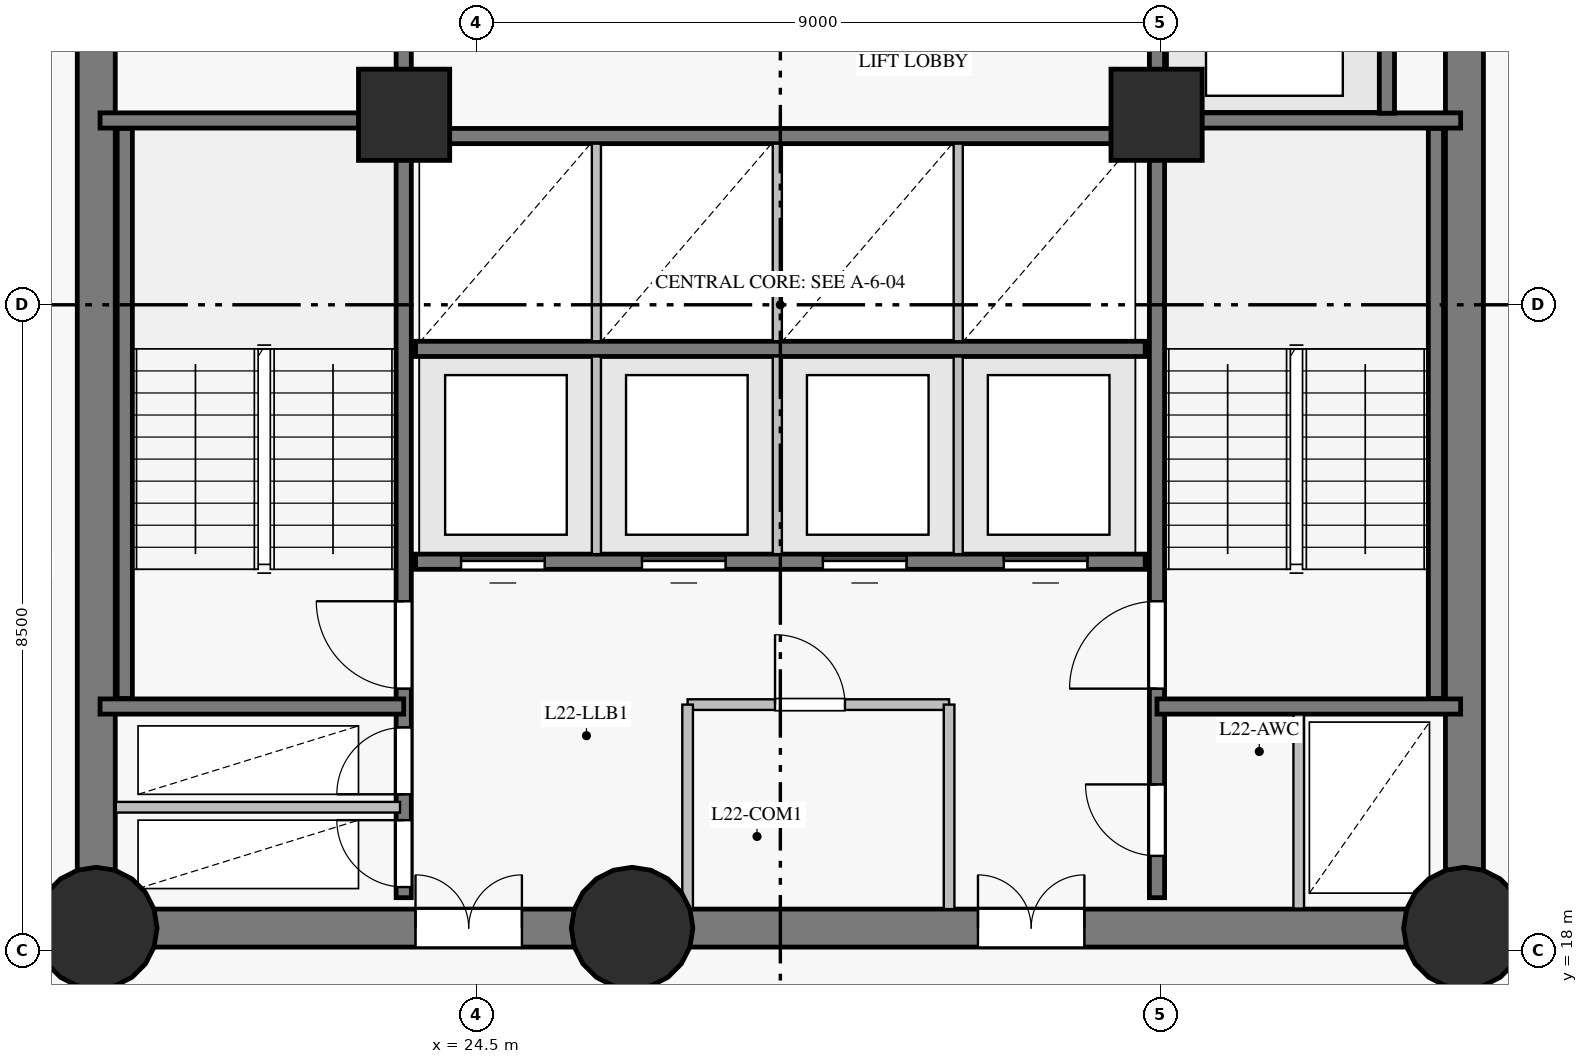
"""IFC4 building model, lengths in metres.
Left out: names, types, materials, properties, quantities, classifications, styles, units other than length and angle.
Written with IfcOpenShell. Run it as: python <this file> out.ifc"""

import sys

from ifc_helpers import new_model, si_unit, direction, frame, frame_2d, origin, origin_with_axes, origin_2d, place, context, subcontext, project, spatial, rectangle, circle, extrude, source, transform, mapped, element, fill, save


model = new_model("IFC4")
c1 = context("Model", 3, precision=1e-05, world=origin(), true_north=direction((0.0, 1.0)))
c2 = subcontext(c1, "Body", "Model", "MODEL_VIEW")
j1 = project(units=[si_unit("LENGTHUNIT", "METRE"), si_unit("PLANEANGLEUNIT", "RADIAN")], contexts=[c1])
p1 = place(None, origin())
s1 = spatial("IfcSite", under=j1, at=p1, CompositionType="ELEMENT")
p2 = place(p1, origin())
s2 = spatial("IfcBuilding", under=s1, at=p2, CompositionType="ELEMENT")
p3 = place(p2, frame((0.0, 0.0, 84.1)))
s3 = spatial("IfcBuildingStorey", under=s2, at=p3, CompositionType="ELEMENT", Elevation=84.1)
p4 = place(p3, frame((19.5, 18.3, 0.0), z_axis=(0.0, 0.0, 1.0), x_axis=(1.0, 0.0, 0.0)))
e1 = element("IfcWall", 1, at=p4, inside=s3, PredefinedType="SHEAR", context=c2, shape_type="SweptSolid", body=[
    extrude(rectangle(XDim=7.05, YDim=0.5, at=frame_2d((3.525, 0.0))), origin(), (0.0, 0.0, 1.0), 3.325),
])
p5 = place(p4, frame((4.2, 0.0, 0.0)))
e2 = element("IfcOpeningElement", 2, at=p5, cuts=e1, PredefinedType="OPENING", context=c2, shape_type="SweptSolid", body=[
    extrude(rectangle(XDim=1.4, YDim=2.2, at=frame_2d((0.7, 1.1))), frame((0.0, 0.26, 0.0), z_axis=(0.0, -1.0, 0.0), x_axis=(1.0, 0.0, 0.0)), (0.0, 0.0, 1.0), 0.52),
])
p6 = place(p3, frame((26.55, 18.3, 0.0), z_axis=(0.0, 0.0, 1.0), x_axis=(1.0, 0.0, 0.0)))
e3 = element("IfcWall", 3, at=p6, inside=s3, PredefinedType="SHEAR", context=c2, shape_type="SweptSolid", body=[
    extrude(rectangle(XDim=10.95, YDim=0.5, at=frame_2d((5.475, 0.0))), origin(), (0.0, 0.0, 1.0), 3.325),
])
p7 = place(p6, frame((4.55, 0.0, 0.0)))
e4 = element("IfcOpeningElement", 4, at=p7, cuts=e3, PredefinedType="OPENING", context=c2, shape_type="SweptSolid", body=[
    extrude(rectangle(XDim=1.4, YDim=2.2, at=frame_2d((0.7, 1.1))), frame((0.0, 0.26, 0.0), z_axis=(0.0, -1.0, 0.0), x_axis=(1.0, 0.0, 0.0)), (0.0, 0.0, 1.0), 0.52),
])
p8 = place(p3, frame((37.5, 18.3, 0.0), z_axis=(0.0, 0.0, 1.0), x_axis=(0.0, 1.0, 0.0)))
e5 = element("IfcWall", 5, at=p8, inside=s3, PredefinedType="SHEAR", context=c2, shape_type="SweptSolid", body=[
    extrude(rectangle(XDim=16.4, YDim=0.5, at=frame_2d((8.2, 0.0))), origin(), (0.0, 0.0, 1.0), 3.325),
])
p9 = place(p8, frame((14.06, 0.0, 0.0)))
e6 = element("IfcOpeningElement", 6, at=p9, cuts=e5, PredefinedType="OPENING", context=c2, shape_type="SweptSolid", body=[
    extrude(rectangle(XDim=1.2, YDim=2.15, at=frame_2d((0.6, 1.075))), frame((0.0, 0.26, 0.0), z_axis=(0.0, -1.0, 0.0), x_axis=(1.0, 0.0, 0.0)), (0.0, 0.0, 1.0), 0.52),
])
p10 = place(p3, frame((19.5, 34.7, 0.0), z_axis=(0.0, 0.0, 1.0), x_axis=(0.0, -1.0, 0.0)))
e7 = element("IfcWall", 7, at=p10, inside=s3, PredefinedType="SHEAR", context=c2, shape_type="SweptSolid", body=[
    extrude(rectangle(XDim=16.4, YDim=0.5, at=frame_2d((8.2, 0.0))), origin(), (0.0, 0.0, 1.0), 3.325),
])
p11 = place(p10, frame((3.1, 0.0, 0.0)))
e8 = element("IfcOpeningElement", 8, at=p11, cuts=e7, PredefinedType="OPENING", context=c2, shape_type="SweptSolid", body=[
    extrude(rectangle(XDim=1.1, YDim=2.15, at=frame_2d((0.55, 1.075))), frame((0.0, 0.26, 0.0), z_axis=(0.0, -1.0, 0.0), x_axis=(1.0, 0.0, 0.0)), (0.0, 0.0, 1.0), 0.52),
])
m1 = source(origin_with_axes(), c2, "Body", "SweptSolid", [
    extrude(circle(Radius=0.8, at=origin_2d()), origin(), (0.0, 0.0, 1.0), 3.6),
])
for number, where, z_axis, x_axis in (
    (9, (19.5, 18.3, 0.0), (0.0, 0.0, 1.0), (1.0, 0.0, 0.0)),
    (10, (26.55, 18.3, 0.0), (0.0, 0.0, 1.0), (1.0, 0.0, 0.0)),
    (11, (37.5, 18.3, 0.0), (0.0, 0.0, 1.0), (1.0, 0.0, 0.0)),
):
    element("IfcColumn", number, at=place(p3, frame(where, z_axis=z_axis, x_axis=x_axis)), inside=s3, PredefinedType="COLUMN", context=c2, shape_type="MappedRepresentation", body=[
        mapped(m1, transform((0.0, 0.0, 0.0), scale=1.0)),
    ])
m2 = source(origin_with_axes(), c2, "Body", "SweptSolid", [
    extrude(rectangle(XDim=1.2, YDim=1.2, at=origin_2d()), origin(), (0.0, 0.0, 1.0), 3.6),
])
for number, where, z_axis, x_axis in (
    (12, (23.55, 29.0, 0.0), (0.0, 0.0, 1.0), (1.0, 0.0, 0.0)),
    (13, (33.45, 29.0, 0.0), (0.0, 0.0, 1.0), (1.0, 0.0, 0.0)),
):
    element("IfcColumn", number, at=place(p3, frame(where, z_axis=z_axis, x_axis=x_axis)), inside=s3, PredefinedType="COLUMN", context=c2, shape_type="MappedRepresentation", body=[
        mapped(m2, transform((0.0, 0.0, 0.0), scale=1.0)),
    ])
p12 = place(p3, frame((23.545, 18.7, 0.0), z_axis=(0.0, 0.0, 1.0), x_axis=(0.0, 1.0, 0.0)))
e14 = element("IfcWall", 14, at=p12, inside=s3, PredefinedType="SHEAR", context=c2, shape_type="SweptSolid", body=[
    extrude(rectangle(XDim=15.6, YDim=0.2, at=frame_2d((7.8, 0.0))), origin(), (0.0, 0.0, 1.0), 3.325),
])
p13 = place(p12, frame((2.75, 0.0, 0.0)))
e15 = element("IfcOpeningElement", 15, at=p13, cuts=e14, PredefinedType="OPENING", context=c2, shape_type="SweptSolid", body=[
    extrude(rectangle(XDim=1.15, YDim=2.15, at=frame_2d((0.575, 1.075))), frame((0.0, 0.11, 0.0), z_axis=(0.0, -1.0, 0.0), x_axis=(1.0, 0.0, 0.0)), (0.0, 0.0, 1.0), 0.22),
])
p14 = place(p12, frame((0.14, 0.0, 0.0)))
e16 = element("IfcOpeningElement", 16, at=p14, cuts=e14, PredefinedType="OPENING", context=c2, shape_type="SweptSolid", body=[
    extrude(rectangle(XDim=0.88, YDim=2.1, at=frame_2d((0.44, 1.05))), frame((0.0, 0.11, 0.0), z_axis=(0.0, -1.0, 0.0), x_axis=(1.0, 0.0, 0.0)), (0.0, 0.0, 1.0), 0.22),
])
p15 = place(p12, frame((1.36, 0.0, 0.0)))
e17 = element("IfcOpeningElement", 17, at=p15, cuts=e14, PredefinedType="OPENING", context=c2, shape_type="SweptSolid", body=[
    extrude(rectangle(XDim=0.88, YDim=2.1, at=frame_2d((0.44, 1.05))), frame((0.0, 0.11, 0.0), z_axis=(0.0, -1.0, 0.0), x_axis=(1.0, 0.0, 0.0)), (0.0, 0.0, 1.0), 0.22),
])
p16 = place(p12, frame((12.1, 0.0, 0.0)))
e18 = element("IfcOpeningElement", 18, at=p16, cuts=e14, PredefinedType="OPENING", context=c2, shape_type="SweptSolid", body=[
    extrude(rectangle(XDim=1.12, YDim=2.15, at=frame_2d((0.56, 1.075))), frame((0.0, 0.11, 0.0), z_axis=(0.0, -1.0, 0.0), x_axis=(1.0, 0.0, 0.0)), (0.0, 0.0, 1.0), 0.22),
])
p17 = place(p12, frame((14.05, 0.0, 0.0)))
e19 = element("IfcOpeningElement", 19, at=p17, cuts=e14, PredefinedType="OPENING", context=c2, shape_type="SweptSolid", body=[
    extrude(rectangle(XDim=1.12, YDim=2.15, at=frame_2d((0.56, 1.075))), frame((0.0, 0.11, 0.0), z_axis=(0.0, -1.0, 0.0), x_axis=(1.0, 0.0, 0.0)), (0.0, 0.0, 1.0), 0.22),
])
p18 = place(p3, frame((33.455, 18.7, 0.0), z_axis=(0.0, 0.0, 1.0), x_axis=(0.0, 1.0, 0.0)))
e20 = element("IfcWall", 20, at=p18, inside=s3, PredefinedType="SHEAR", context=c2, shape_type="SweptSolid", body=[
    extrude(rectangle(XDim=15.6, YDim=0.2, at=frame_2d((7.8, 0.0))), origin(), (0.0, 0.0, 1.0), 3.325),
])
p19 = place(p18, frame((2.75, 0.0, 0.0)))
e21 = element("IfcOpeningElement", 21, at=p19, cuts=e20, PredefinedType="OPENING", context=c2, shape_type="SweptSolid", body=[
    extrude(rectangle(XDim=1.15, YDim=2.15, at=frame_2d((0.575, 1.075))), frame((0.0, 0.11, 0.0), z_axis=(0.0, -1.0, 0.0), x_axis=(1.0, 0.0, 0.0)), (0.0, 0.0, 1.0), 0.22),
])
p20 = place(p18, frame((0.55, 0.0, 0.0)))
e22 = element("IfcOpeningElement", 22, at=p20, cuts=e20, PredefinedType="OPENING", context=c2, shape_type="SweptSolid", body=[
    extrude(rectangle(XDim=0.94, YDim=2.1, at=frame_2d((0.47, 1.05))), frame((0.0, 0.11, 0.0), z_axis=(0.0, -1.0, 0.0), x_axis=(1.0, 0.0, 0.0)), (0.0, 0.0, 1.0), 0.22),
])
p21 = place(p3, frame((23.7, 23.12, 0.0), z_axis=(0.0, 0.0, 1.0), x_axis=(1.0, 0.0, 0.0)))
e23 = element("IfcWall", 23, at=p21, inside=s3, PredefinedType="SHEAR", context=c2, shape_type="SweptSolid", body=[
    extrude(rectangle(XDim=9.6, YDim=0.2, at=frame_2d((4.8, 0.0))), origin(), (0.0, 0.0, 1.0), 3.325),
])
p22 = place(p21, frame((0.6, 0.0, 0.0)))
e24 = element("IfcOpeningElement", 24, at=p22, cuts=e23, PredefinedType="OPENING", context=c2, shape_type="SweptSolid", body=[
    extrude(rectangle(XDim=1.1, YDim=2.15, at=frame_2d((0.55, 1.075))), frame((0.0, 0.11, 0.0), z_axis=(0.0, -1.0, 0.0), x_axis=(1.0, 0.0, 0.0)), (0.0, 0.0, 1.0), 0.22),
])
p23 = place(p21, frame((2.98, 0.0, 0.0)))
e25 = element("IfcOpeningElement", 25, at=p23, cuts=e23, PredefinedType="OPENING", context=c2, shape_type="SweptSolid", body=[
    extrude(rectangle(XDim=1.1, YDim=2.15, at=frame_2d((0.55, 1.075))), frame((0.0, 0.11, 0.0), z_axis=(0.0, -1.0, 0.0), x_axis=(1.0, 0.0, 0.0)), (0.0, 0.0, 1.0), 0.22),
])
p24 = place(p21, frame((5.36, 0.0, 0.0)))
e26 = element("IfcOpeningElement", 26, at=p24, cuts=e23, PredefinedType="OPENING", context=c2, shape_type="SweptSolid", body=[
    extrude(rectangle(XDim=1.1, YDim=2.15, at=frame_2d((0.55, 1.075))), frame((0.0, 0.11, 0.0), z_axis=(0.0, -1.0, 0.0), x_axis=(1.0, 0.0, 0.0)), (0.0, 0.0, 1.0), 0.22),
])
p25 = place(p21, frame((7.74, 0.0, 0.0)))
e27 = element("IfcOpeningElement", 27, at=p25, cuts=e23, PredefinedType="OPENING", context=c2, shape_type="SweptSolid", body=[
    extrude(rectangle(XDim=1.1, YDim=2.15, at=frame_2d((0.55, 1.075))), frame((0.0, 0.11, 0.0), z_axis=(0.0, -1.0, 0.0), x_axis=(1.0, 0.0, 0.0)), (0.0, 0.0, 1.0), 0.22),
])
for number, where, z_axis, x_axis in (
    (28, (23.7, 25.92, 0.0), (0.0, 0.0, 1.0), (1.0, 0.0, 0.0)),
    (29, (23.7, 28.72, 0.0), (0.0, 0.0, 1.0), (1.0, 0.0, 0.0)),
):
    element("IfcWall", number, at=place(p3, frame(where, z_axis=z_axis, x_axis=x_axis)), inside=s3, PredefinedType="SHEAR", context=c2, shape_type="SweptSolid", body=[
        extrude(rectangle(XDim=9.6, YDim=0.2, at=frame_2d((4.8, 0.0))), origin(), (0.0, 0.0, 1.0), 3.325),
    ])
for number, where, z_axis, x_axis in (
    (30, (19.875, 21.32, 0.0), (0.0, 0.0, 1.0), (0.0, 1.0, 0.0)),
    (31, (37.125, 21.32, 0.0), (0.0, 0.0, 1.0), (0.0, 1.0, 0.0)),
):
    element("IfcWall", number, at=place(p3, frame(where, z_axis=z_axis, x_axis=x_axis)), inside=s3, PredefinedType="SHEAR", context=c2, shape_type="SweptSolid", body=[
        extrude(rectangle(XDim=7.5, YDim=0.2, at=frame_2d((3.75, 0.0))), origin(), (0.0, 0.0, 1.0), 3.325),
    ])
for number, where, z_axis, x_axis in (
    (32, (33.455, 21.215, 0.0), (0.0, 0.0, 1.0), (1.0, 0.0, 0.0)),
    (33, (33.455, 28.925, 0.0), (0.0, 0.0, 1.0), (1.0, 0.0, 0.0)),
    (34, (19.55, 21.215, 0.0), (0.0, 0.0, 1.0), (1.0, 0.0, 0.0)),
    (35, (19.55, 28.925, 0.0), (0.0, 0.0, 1.0), (1.0, 0.0, 0.0)),
):
    element("IfcWall", number, at=place(p3, frame(where, z_axis=z_axis, x_axis=x_axis)), inside=s3, PredefinedType="SHEAR", context=c2, shape_type="SweptSolid", body=[
        extrude(rectangle(XDim=3.995, YDim=0.2, at=frame_2d((1.998, 0.0))), origin(), (0.0, 0.0, 1.0), 3.325),
    ])
p26 = place(p3, frame((36.48, 29.02, 0.0), z_axis=(0.0, 0.0, 1.0), x_axis=(0.0, 1.0, 0.0)))
e36 = element("IfcWall", 36, at=p26, inside=s3, PredefinedType="SHEAR", context=c2, shape_type="SweptSolid", body=[
    extrude(rectangle(XDim=2.86, YDim=0.2, at=frame_2d((1.43, 0.0))), origin(), (0.0, 0.0, 1.0), 3.325),
])
p27 = place(p3, frame((19.757, 19.89, 0.0), z_axis=(0.0, 0.0, 1.0), x_axis=(1.0, 0.0, 0.0)))
e37 = element("IfcWall", 37, at=p27, inside=s3, PredefinedType="PARTITIONING", context=c2, shape_type="SweptSolid", body=[
    extrude(rectangle(XDim=3.739, YDim=0.14, at=frame_2d((1.87, 0.0))), origin(), (0.0, 0.0, 1.0), 3.325),
])
p28 = place(p3, frame((27.28, 21.24, 0.0), z_axis=(0.0, 0.0, 1.0), x_axis=(1.0, 0.0, 0.0)))
e38 = element("IfcWall", 38, at=p28, inside=s3, PredefinedType="PARTITIONING", context=c2, shape_type="SweptSolid", body=[
    extrude(rectangle(XDim=3.44, YDim=0.14, at=frame_2d((1.72, 0.0))), origin(), (0.0, 0.0, 1.0), 3.325),
])
p29 = place(p28, frame((1.15, 0.0, 0.0)))
e39 = element("IfcOpeningElement", 39, at=p29, cuts=e38, PredefinedType="OPENING", context=c2, shape_type="SweptSolid", body=[
    extrude(rectangle(XDim=0.92, YDim=2.1, at=frame_2d((0.46, 1.05))), frame((0.0, 0.08, 0.0), z_axis=(0.0, -1.0, 0.0), x_axis=(1.0, 0.0, 0.0)), (0.0, 0.0, 1.0), 0.16),
])
for number, where, z_axis, x_axis in (
    (40, (27.28, 18.55, 0.0), (0.0, 0.0, 1.0), (0.0, 1.0, 0.0)),
    (41, (30.72, 18.55, 0.0), (0.0, 0.0, 1.0), (0.0, 1.0, 0.0)),
):
    element("IfcWall", number, at=place(p3, frame(where, z_axis=z_axis, x_axis=x_axis)), inside=s3, PredefinedType="PARTITIONING", context=c2, shape_type="SweptSolid", body=[
        extrude(rectangle(XDim=2.69, YDim=0.14, at=frame_2d((1.345, 0.0))), origin(), (0.0, 0.0, 1.0), 3.325),
    ])
for number, where, z_axis, x_axis in (
    (42, (26.08, 23.22, 0.0), (0.0, 0.0, 1.0), (0.0, 1.0, 0.0)),
    (43, (28.46, 23.22, 0.0), (0.0, 0.0, 1.0), (0.0, 1.0, 0.0)),
    (44, (30.84, 23.22, 0.0), (0.0, 0.0, 1.0), (0.0, 1.0, 0.0)),
    (45, (26.08, 26.02, 0.0), (0.0, 0.0, 1.0), (0.0, 1.0, 0.0)),
    (46, (28.46, 26.02, 0.0), (0.0, 0.0, 1.0), (0.0, 1.0, 0.0)),
    (47, (30.84, 26.02, 0.0), (0.0, 0.0, 1.0), (0.0, 1.0, 0.0)),
):
    element("IfcWall", number, at=place(p3, frame(where, z_axis=z_axis, x_axis=x_axis)), inside=s3, PredefinedType="PARTITIONING", context=c2, shape_type="SweptSolid", body=[
        extrude(rectangle(XDim=2.6, YDim=0.12, at=frame_2d((1.3, 0.0))), origin(), (0.0, 0.0, 1.0), 3.325),
    ])
p30 = place(p3, frame((35.32, 18.557, 0.0), z_axis=(0.0, 0.0, 1.0), x_axis=(0.0, 1.0, 0.0)))
e48 = element("IfcWall", 48, at=p30, inside=s3, PredefinedType="PARTITIONING", context=c2, shape_type="SweptSolid", body=[
    extrude(rectangle(XDim=2.553, YDim=0.14, at=frame_2d((1.277, 0.0))), origin(), (0.0, 0.0, 1.0), 3.325),
])
m3 = source(origin_with_axes(), c2, "Body", "SweptSolid", [
    extrude(rectangle(XDim=1.15, YDim=2.15, at=frame_2d((0.575, 1.075))), frame((0.0, 0.025, 0.0), z_axis=(0.0, -1.0, 0.0), x_axis=(1.0, 0.0, 0.0)), (0.0, 0.0, 1.0), 0.05),
])
p31 = place(p13, origin())
e49 = element("IfcDoor", 49, at=p31, inside=s3, OperationType="SINGLE_SWING_RIGHT", PredefinedType="DOOR", context=c2, shape_type="MappedRepresentation", body=[
    mapped(m3, transform((0.0, 0.0, 0.0), scale=1.0)),
])
fill(e15, e49)
p32 = place(p19, origin())
e50 = element("IfcDoor", 50, at=p32, inside=s3, OperationType="SINGLE_SWING_LEFT", PredefinedType="DOOR", context=c2, shape_type="MappedRepresentation", body=[
    mapped(m3, transform((0.0, 0.0, 0.0), scale=1.0)),
])
fill(e21, e50)
m4 = source(origin_with_axes(), c2, "Body", "SweptSolid", [
    extrude(rectangle(XDim=0.88, YDim=2.1, at=frame_2d((0.44, 1.05))), frame((0.0, 0.025, 0.0), z_axis=(0.0, -1.0, 0.0), x_axis=(1.0, 0.0, 0.0)), (0.0, 0.0, 1.0), 0.05),
])
p33 = place(p14, origin())
e51 = element("IfcDoor", 51, at=p33, inside=s3, OperationType="SINGLE_SWING_RIGHT", PredefinedType="DOOR", context=c2, shape_type="MappedRepresentation", body=[
    mapped(m4, transform((0.0, 0.0, 0.0), scale=1.0)),
])
fill(e16, e51)
p34 = place(p15, origin())
e52 = element("IfcDoor", 52, at=p34, inside=s3, OperationType="SINGLE_SWING_LEFT", PredefinedType="DOOR", context=c2, shape_type="MappedRepresentation", body=[
    mapped(m4, transform((0.0, 0.0, 0.0), scale=1.0)),
])
fill(e17, e52)
m5 = source(origin_with_axes(), c2, "Body", "SweptSolid", [
    extrude(rectangle(XDim=1.4, YDim=2.2, at=frame_2d((0.7, 1.1))), frame((0.0, 0.025, 0.0), z_axis=(0.0, -1.0, 0.0), x_axis=(1.0, 0.0, 0.0)), (0.0, 0.0, 1.0), 0.05),
])
p35 = place(p5, origin())
e53 = element("IfcDoor", 53, at=p35, inside=s3, OperationType="DOUBLE_DOOR_SINGLE_SWING", PredefinedType="DOOR", context=c2, shape_type="MappedRepresentation", body=[
    mapped(m5, transform((0.0, 0.0, 0.0), scale=1.0)),
])
fill(e2, e53)
p36 = place(p7, origin())
e54 = element("IfcDoor", 54, at=p36, inside=s3, OperationType="DOUBLE_DOOR_SINGLE_SWING", PredefinedType="DOOR", context=c2, shape_type="MappedRepresentation", body=[
    mapped(m5, transform((0.0, 0.0, 0.0), scale=1.0)),
])
fill(e4, e54)
m6 = source(origin_with_axes(), c2, "Body", "SweptSolid", [
    extrude(rectangle(XDim=0.94, YDim=2.1, at=frame_2d((0.47, 1.05))), frame((0.0, 0.025, 0.0), z_axis=(0.0, -1.0, 0.0), x_axis=(1.0, 0.0, 0.0)), (0.0, 0.0, 1.0), 0.05),
])
p37 = place(p20, origin())
e55 = element("IfcDoor", 55, at=p37, inside=s3, OperationType="SINGLE_SWING_RIGHT", PredefinedType="DOOR", context=c2, shape_type="MappedRepresentation", body=[
    mapped(m6, transform((0.0, 0.0, 0.0), scale=1.0)),
])
fill(e22, e55)
m7 = source(origin_with_axes(), c2, "Body", "SweptSolid", [
    extrude(rectangle(XDim=0.92, YDim=2.1, at=frame_2d((0.46, 1.05))), frame((0.0, 0.025, 0.0), z_axis=(0.0, -1.0, 0.0), x_axis=(1.0, 0.0, 0.0)), (0.0, 0.0, 1.0), 0.05),
])
p38 = place(p29, origin())
e56 = element("IfcDoor", 56, at=p38, inside=s3, OperationType="SINGLE_SWING_LEFT", PredefinedType="DOOR", context=c2, shape_type="MappedRepresentation", body=[
    mapped(m7, transform((0.0, 0.0, 0.0), scale=1.0)),
])
fill(e39, e56)
m8 = source(origin_with_axes(), c2, "Body", "SweptSolid", [
    extrude(rectangle(XDim=1.1, YDim=2.15, at=frame_2d((0.55, 1.075))), frame((0.0, 0.025, 0.0), z_axis=(0.0, -1.0, 0.0), x_axis=(1.0, 0.0, 0.0)), (0.0, 0.0, 1.0), 0.05),
])
p39 = place(p22, origin())
e57 = element("IfcDoor", 57, at=p39, inside=s3, OperationType="SLIDING_TO_LEFT", PredefinedType="DOOR", context=c2, shape_type="MappedRepresentation", body=[
    mapped(m8, transform((0.0, 0.0, 0.0), scale=1.0)),
])
fill(e24, e57)
p40 = place(p23, origin())
e58 = element("IfcDoor", 58, at=p40, inside=s3, OperationType="SLIDING_TO_RIGHT", PredefinedType="DOOR", context=c2, shape_type="MappedRepresentation", body=[
    mapped(m8, transform((0.0, 0.0, 0.0), scale=1.0)),
])
fill(e25, e58)
p41 = place(p24, origin())
e59 = element("IfcDoor", 59, at=p41, inside=s3, OperationType="SLIDING_TO_LEFT", PredefinedType="DOOR", context=c2, shape_type="MappedRepresentation", body=[
    mapped(m8, transform((0.0, 0.0, 0.0), scale=1.0)),
])
fill(e26, e59)
p42 = place(p25, origin())
e60 = element("IfcDoor", 60, at=p42, inside=s3, OperationType="SLIDING_TO_RIGHT", PredefinedType="DOOR", context=c2, shape_type="MappedRepresentation", body=[
    mapped(m8, transform((0.0, 0.0, 0.0), scale=1.0)),
])
fill(e27, e60)
save(model, sys.argv[1])
